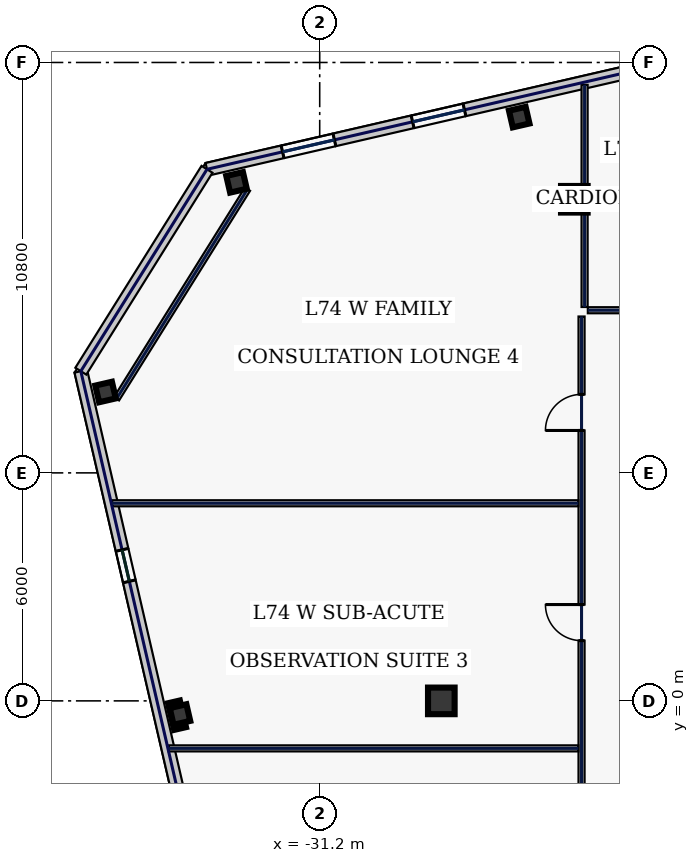
"""IFC4 building model, lengths in metres.
Left out: names, types, materials, properties, quantities, classifications, styles, units other than length and angle.
Written with IfcOpenShell. Run it as: python <this file> out.ifc"""

import sys

from ifc_helpers import new_model, si_unit, direction, frame, frame_2d, origin, origin_2d, place, context, subcontext, project, spatial, rectangle, hollow_rectangle, extrude, element, fill, save


model = new_model("IFC4")
c1 = context("Model", 3, precision=1e-05, world=origin(), true_north=direction((0.0, 1.0)))
c2 = subcontext(c1, "Body", "Model", "MODEL_VIEW")
j1 = project(units=[si_unit("LENGTHUNIT", "METRE"), si_unit("PLANEANGLEUNIT", "RADIAN")], contexts=[c1])
p1 = place(None, origin())
s1 = spatial("IfcSite", under=j1, at=p1, CompositionType="ELEMENT")
p2 = place(p1, origin())
s2 = spatial("IfcBuilding", under=s1, at=p2, CompositionType="ELEMENT")
p3 = place(p2, frame((0.0, 0.0, 317.0)))
s3 = spatial("IfcBuildingStorey", under=s2, at=p3, CompositionType="ELEMENT", Elevation=317.0)
for number, where, z_axis, x_axis in (
    (1, (-24.5, 13.2, 0.0), (0.0, 0.0, 1.0), (1.0, 0.0, 0.0)),
    (2, (-28.0, 0.0, 0.0), (0.0, 0.0, 1.0), (1.0, 0.0, 0.0)),
):
    element("IfcColumn", number, at=place(p3, frame(where, z_axis=z_axis, x_axis=x_axis)), inside=s3, PredefinedType="COLUMN", context=c2, shape_type="SweptSolid", body=[
        extrude(hollow_rectangle(XDim=0.7, YDim=0.7, WallThickness=0.032, at=origin_2d()), origin(), (0.0, 0.0, 1.0), 3.74),
    ])
for number, where, z_axis, x_axis in (
    (3, (-25.95, 15.362, 0.0), (0.0, 0.0, 1.0), (0.974, 0.225, 0.0)),
    (4, (-33.389, 13.645, 0.0), (0.0, 0.0, 1.0), (0.974, 0.225, 0.0)),
    (5, (-36.836, 8.128, 0.0), (0.0, 0.0, 1.0), (0.974, 0.225, 0.0)),
    (6, (-34.877, -0.359, 0.0), (0.0, 0.0, 1.0), (0.974, 0.225, 0.0)),
):
    element("IfcColumn", number, at=place(p3, frame(where, z_axis=z_axis, x_axis=x_axis)), inside=s3, PredefinedType="COLUMN", context=c2, shape_type="SweptSolid", body=[
        extrude(hollow_rectangle(XDim=0.45, YDim=0.45, WallThickness=0.022, at=origin_2d()), origin(), (0.0, 0.0, 1.0), 3.74),
    ])
p4 = place(p3, frame((-17.245, 17.895, 0.0), z_axis=(0.0, 0.0, 1.0), x_axis=(-0.97437318493, -0.224937539085, 0.0)))
e7 = element("IfcWall", 7, at=p4, inside=s3, PredefinedType="STANDARD", context=c2, shape_type="SweptSolid", body=[
    extrude(rectangle(XDim=17.366, YDim=0.34, at=frame_2d((8.683, 0.0))), origin(), (0.0, 0.0, 1.0), 3.74),
])
p5 = place(p4, frame((13.925, 0.0, 1.0)))
e8 = element("IfcOpeningElement", 8, at=p5, cuts=e7, PredefinedType="OPENING", context=c2, shape_type="SweptSolid", body=[
    extrude(rectangle(XDim=1.4, YDim=1.85, at=frame_2d((0.7, 0.925))), frame((0.0, 0.18, 0.0), z_axis=(0.0, -1.0, 0.0), x_axis=(1.0, 0.0, 0.0)), (0.0, 0.0, 1.0), 0.36),
])
p6 = place(p4, frame((10.413, 0.0, 1.0)))
e9 = element("IfcOpeningElement", 9, at=p6, cuts=e7, PredefinedType="OPENING", context=c2, shape_type="SweptSolid", body=[
    extrude(rectangle(XDim=1.4, YDim=1.85, at=frame_2d((0.7, 0.925))), frame((0.0, 0.18, 0.0), z_axis=(0.0, -1.0, 0.0), x_axis=(1.0, 0.0, 0.0)), (0.0, 0.0, 1.0), 0.36),
])
p7 = place(p4, frame((2.779, 0.0, 1.0)))
e10 = element("IfcOpeningElement", 10, at=p7, cuts=e7, PredefinedType="OPENING", context=c2, shape_type="SweptSolid", body=[
    extrude(rectangle(XDim=1.4, YDim=1.85, at=frame_2d((0.7, 0.925))), frame((0.0, 0.18, 0.0), z_axis=(0.0, -1.0, 0.0), x_axis=(1.0, 0.0, 0.0)), (0.0, 0.0, 1.0), 0.36),
])
p8 = place(p3, frame((-37.486, 8.676, 0.0), z_axis=(0.0, 0.0, 1.0), x_axis=(0.224953091034, -0.974369594576, 0.0)))
e11 = element("IfcWall", 11, at=p8, inside=s3, PredefinedType="STANDARD", context=c2, shape_type="SweptSolid", body=[
    extrude(rectangle(XDim=36.2, YDim=0.34, at=frame_2d((18.1, 0.0))), origin(), (0.0, 0.0, 1.0), 3.74),
])
p9 = place(p8, frame((4.825, 0.0, 0.75)))
e12 = element("IfcOpeningElement", 12, at=p9, cuts=e11, PredefinedType="OPENING", context=c2, shape_type="SweptSolid", body=[
    extrude(rectangle(XDim=0.85, YDim=1.85, at=frame_2d((0.425, 0.925))), frame((0.0, 0.18, 0.0), z_axis=(0.0, -1.0, 0.0), x_axis=(1.0, 0.0, 0.0)), (0.0, 0.0, 1.0), 0.36),
])
p10 = place(p8, frame((12.425, 0.0, 0.75)))
e13 = element("IfcOpeningElement", 13, at=p10, cuts=e11, PredefinedType="OPENING", context=c2, shape_type="SweptSolid", body=[
    extrude(rectangle(XDim=0.85, YDim=1.85, at=frame_2d((0.425, 0.925))), frame((0.0, 0.18, 0.0), z_axis=(0.0, -1.0, 0.0), x_axis=(1.0, 0.0, 0.0)), (0.0, 0.0, 1.0), 0.36),
])
p11 = place(p8, frame((21.825, 0.0, 0.58)))
e14 = element("IfcOpeningElement", 14, at=p11, cuts=e11, PredefinedType="OPENING", context=c2, shape_type="SweptSolid", body=[
    extrude(rectangle(XDim=1.6, YDim=2.3, at=frame_2d((0.8, 1.15))), frame((0.0, 0.18, 0.0), z_axis=(0.0, -1.0, 0.0), x_axis=(1.0, 0.0, 0.0)), (0.0, 0.0, 1.0), 0.36),
])
p12 = place(p8, frame((30.875, 0.0, 0.58)))
e15 = element("IfcOpeningElement", 15, at=p12, cuts=e11, PredefinedType="OPENING", context=c2, shape_type="SweptSolid", body=[
    extrude(rectangle(XDim=1.6, YDim=2.3, at=frame_2d((0.8, 1.15))), frame((0.0, 0.18, 0.0), z_axis=(0.0, -1.0, 0.0), x_axis=(1.0, 0.0, 0.0)), (0.0, 0.0, 1.0), 0.36),
])
p13 = place(p3, frame((-34.166, 13.989, 0.0), z_axis=(0.0, 0.0, 1.0), x_axis=(-0.529935887993, -0.848037708252, 0.0)))
e16 = element("IfcWall", 16, at=p13, inside=s3, PredefinedType="STANDARD", context=c2, shape_type="SweptSolid", body=[
    extrude(rectangle(XDim=6.265, YDim=0.34, at=frame_2d((3.133, 0.0))), origin(), (0.0, 0.0, 1.0), 3.74),
])
p14 = place(p3, frame((-33.1, 13.465, 0.0), z_axis=(0.0, 0.0, 1.0), x_axis=(-0.529958457806, -0.848023604035, 0.0)))
e17 = element("IfcWall", 17, at=p14, inside=s3, PredefinedType="PARTITIONING", context=c2, shape_type="SweptSolid", body=[
    extrude(rectangle(XDim=6.505, YDim=0.16, at=frame_2d((3.252, 0.0))), origin(), (0.0, 0.0, 1.0), 3.74),
])
p15 = place(p3, frame((-24.31, -10.015, 0.0), z_axis=(0.0, 0.0, 1.0), x_axis=(0.0, 1.0, 0.0)))
e18 = element("IfcWall", 18, at=p15, inside=s3, PredefinedType="PARTITIONING", context=c2, shape_type="SweptSolid", body=[
    extrude(rectangle(XDim=20.13, YDim=0.16, at=frame_2d((10.065, 0.0))), origin(), (0.0, 0.0, 1.0), 3.74),
])
p16 = place(p15, frame((2.169, 0.0, 0.0)))
e19 = element("IfcOpeningElement", 19, at=p16, cuts=e18, PredefinedType="OPENING", context=c2, shape_type="SweptSolid", body=[
    extrude(rectangle(XDim=0.95, YDim=2.2, at=frame_2d((0.475, 1.1))), frame((0.0, 0.09, 0.0), z_axis=(0.0, -1.0, 0.0), x_axis=(1.0, 0.0, 0.0)), (0.0, 0.0, 1.0), 0.18),
])
p17 = place(p15, frame((6.4, 0.0, 0.0)))
e20 = element("IfcOpeningElement", 20, at=p17, cuts=e18, PredefinedType="OPENING", context=c2, shape_type="SweptSolid", body=[
    extrude(rectangle(XDim=0.95, YDim=2.2, at=frame_2d((0.475, 1.1))), frame((0.0, 0.09, 0.0), z_axis=(0.0, -1.0, 0.0), x_axis=(1.0, 0.0, 0.0)), (0.0, 0.0, 1.0), 0.18),
])
p18 = place(p15, frame((11.6, 0.0, 0.0)))
e21 = element("IfcOpeningElement", 21, at=p18, cuts=e18, PredefinedType="OPENING", context=c2, shape_type="SweptSolid", body=[
    extrude(rectangle(XDim=0.95, YDim=2.2, at=frame_2d((0.475, 1.1))), frame((0.0, 0.09, 0.0), z_axis=(0.0, -1.0, 0.0), x_axis=(1.0, 0.0, 0.0)), (0.0, 0.0, 1.0), 0.18),
])
p19 = place(p15, frame((17.131, 0.0, 0.0)))
e22 = element("IfcOpeningElement", 22, at=p19, cuts=e18, PredefinedType="OPENING", context=c2, shape_type="SweptSolid", body=[
    extrude(rectangle(XDim=0.95, YDim=2.2, at=frame_2d((0.475, 1.1))), frame((0.0, 0.09, 0.0), z_axis=(0.0, -1.0, 0.0), x_axis=(1.0, 0.0, 0.0)), (0.0, 0.0, 1.0), 0.18),
])
p20 = place(p3, frame((-24.145, 10.28, 0.0), z_axis=(0.0, 0.0, 1.0), x_axis=(1.0, 0.0, 0.0)))
e23 = element("IfcWall", 23, at=p20, inside=s3, PredefinedType="PARTITIONING", context=c2, shape_type="SweptSolid", body=[
    extrude(rectangle(XDim=48.29, YDim=0.16, at=frame_2d((24.145, 0.0))), origin(), (0.0, 0.0, 1.0), 3.74),
])
p21 = place(p20, frame((3.134, 0.0, 0.0)))
e24 = element("IfcOpeningElement", 24, at=p21, cuts=e23, PredefinedType="OPENING", context=c2, shape_type="SweptSolid", body=[
    extrude(rectangle(XDim=1.05, YDim=2.2, at=frame_2d((0.525, 1.1))), frame((0.0, 0.09, 0.0), z_axis=(0.0, -1.0, 0.0), x_axis=(1.0, 0.0, 0.0)), (0.0, 0.0, 1.0), 0.18),
])
p22 = place(p20, frame((10.657, 0.0, 0.0)))
e25 = element("IfcOpeningElement", 25, at=p22, cuts=e23, PredefinedType="OPENING", context=c2, shape_type="SweptSolid", body=[
    extrude(rectangle(XDim=0.95, YDim=2.2, at=frame_2d((0.475, 1.1))), frame((0.0, 0.09, 0.0), z_axis=(0.0, -1.0, 0.0), x_axis=(1.0, 0.0, 0.0)), (0.0, 0.0, 1.0), 0.18),
])
p23 = place(p20, frame((18.812, 0.0, 0.0)))
e26 = element("IfcOpeningElement", 26, at=p23, cuts=e23, PredefinedType="OPENING", context=c2, shape_type="SweptSolid", body=[
    extrude(rectangle(XDim=0.95, YDim=2.2, at=frame_2d((0.475, 1.1))), frame((0.0, 0.09, 0.0), z_axis=(0.0, -1.0, 0.0), x_axis=(1.0, 0.0, 0.0)), (0.0, 0.0, 1.0), 0.18),
])
p24 = place(p20, frame((27.712, 0.0, 0.0)))
e27 = element("IfcOpeningElement", 27, at=p24, cuts=e23, PredefinedType="OPENING", context=c2, shape_type="SweptSolid", body=[
    extrude(rectangle(XDim=0.95, YDim=2.2, at=frame_2d((0.475, 1.1))), frame((0.0, 0.09, 0.0), z_axis=(0.0, -1.0, 0.0), x_axis=(1.0, 0.0, 0.0)), (0.0, 0.0, 1.0), 0.18),
])
p25 = place(p20, frame((37.357, 0.0, 0.0)))
e28 = element("IfcOpeningElement", 28, at=p25, cuts=e23, PredefinedType="OPENING", context=c2, shape_type="SweptSolid", body=[
    extrude(rectangle(XDim=0.95, YDim=2.2, at=frame_2d((0.475, 1.1))), frame((0.0, 0.09, 0.0), z_axis=(0.0, -1.0, 0.0), x_axis=(1.0, 0.0, 0.0)), (0.0, 0.0, 1.0), 0.18),
])
p26 = place(p20, frame((44.776, 0.0, 0.0)))
e29 = element("IfcOpeningElement", 29, at=p26, cuts=e23, PredefinedType="OPENING", context=c2, shape_type="SweptSolid", body=[
    extrude(rectangle(XDim=1.05, YDim=2.2, at=frame_2d((0.525, 1.1))), frame((0.0, 0.09, 0.0), z_axis=(0.0, -1.0, 0.0), x_axis=(1.0, 0.0, 0.0)), (0.0, 0.0, 1.0), 0.18),
])
p27 = place(p3, frame((-24.23, 10.365, 0.0), z_axis=(0.0, 0.0, 1.0), x_axis=(0.0, 1.0, 0.0)))
e30 = element("IfcWall", 30, at=p27, inside=s3, PredefinedType="PARTITIONING", context=c2, shape_type="SweptSolid", body=[
    extrude(rectangle(XDim=5.846, YDim=0.16, at=frame_2d((2.923, 0.0))), origin(), (0.0, 0.0, 1.0), 3.74),
])
p28 = place(p3, frame((-35.174, -1.25, 0.0), z_axis=(0.0, 0.0, 1.0), x_axis=(1.0, 0.0, 0.0)))
e31 = element("IfcWall", 31, at=p28, inside=s3, PredefinedType="PARTITIONING", context=c2, shape_type="SweptSolid", body=[
    extrude(rectangle(XDim=10.779, YDim=0.16, at=frame_2d((5.389, 0.0))), origin(), (0.0, 0.0, 1.0), 3.74),
])
p29 = place(p3, frame((-36.663, 5.2, 0.0), z_axis=(0.0, 0.0, 1.0), x_axis=(1.0, 0.0, 0.0)))
e32 = element("IfcWall", 32, at=p29, inside=s3, PredefinedType="PARTITIONING", context=c2, shape_type="SweptSolid", body=[
    extrude(rectangle(XDim=12.268, YDim=0.16, at=frame_2d((6.134, 0.0))), origin(), (0.0, 0.0, 1.0), 3.74),
])
p30 = place(p5, origin())
e33 = element("IfcWindow", 33, at=p30, inside=s3, PartitioningType="SINGLE_PANEL", PredefinedType="WINDOW", context=c2, shape_type="SweptSolid", body=[
    extrude(rectangle(XDim=1.4, YDim=1.85, at=frame_2d((0.7, 0.925))), frame((0.0, 0.03, 0.0), z_axis=(0.0, -1.0, 0.0), x_axis=(1.0, 0.0, 0.0)), (0.0, 0.0, 1.0), 0.06),
])
fill(e8, e33)
p31 = place(p6, origin())
e34 = element("IfcWindow", 34, at=p31, inside=s3, PartitioningType="SINGLE_PANEL", PredefinedType="WINDOW", context=c2, shape_type="SweptSolid", body=[
    extrude(rectangle(XDim=1.4, YDim=1.85, at=frame_2d((0.7, 0.925))), frame((0.0, 0.03, 0.0), z_axis=(0.0, -1.0, 0.0), x_axis=(1.0, 0.0, 0.0)), (0.0, 0.0, 1.0), 0.06),
])
fill(e9, e34)
p32 = place(p9, origin())
e35 = element("IfcWindow", 35, at=p32, inside=s3, PartitioningType="SINGLE_PANEL", PredefinedType="WINDOW", context=c2, shape_type="SweptSolid", body=[
    extrude(rectangle(XDim=0.85, YDim=1.85, at=frame_2d((0.425, 0.925))), frame((0.0, 0.03, 0.0), z_axis=(0.0, -1.0, 0.0), x_axis=(1.0, 0.0, 0.0)), (0.0, 0.0, 1.0), 0.06),
])
fill(e12, e35)
p33 = place(p18, origin())
e36 = element("IfcDoor", 36, at=p33, inside=s3, OperationType="SINGLE_SWING_RIGHT", PredefinedType="DOOR", context=c2, shape_type="SweptSolid", body=[
    extrude(rectangle(XDim=0.95, YDim=2.2, at=frame_2d((0.475, 1.1))), frame((0.0, 0.025, 0.0), z_axis=(0.0, -1.0, 0.0), x_axis=(1.0, 0.0, 0.0)), (0.0, 0.0, 1.0), 0.05),
])
fill(e21, e36)
p34 = place(p19, origin())
e37 = element("IfcDoor", 37, at=p34, inside=s3, OperationType="SINGLE_SWING_LEFT", PredefinedType="DOOR", context=c2, shape_type="SweptSolid", body=[
    extrude(rectangle(XDim=0.95, YDim=2.2, at=frame_2d((0.475, 1.1))), frame((0.0, 0.025, 0.0), z_axis=(0.0, -1.0, 0.0), x_axis=(1.0, 0.0, 0.0)), (0.0, 0.0, 1.0), 0.05),
])
fill(e22, e37)
save(model, sys.argv[1])
